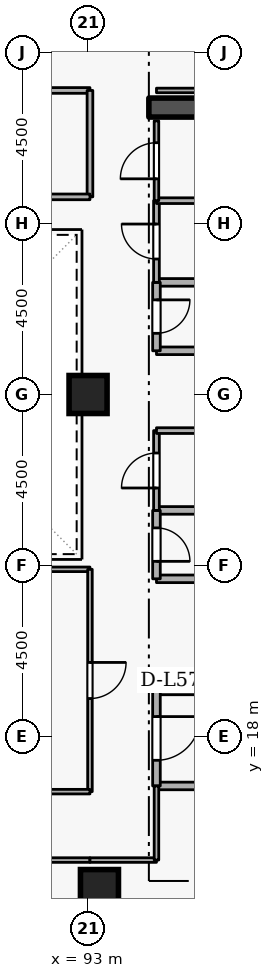
"""IFC4 building model, lengths in metres.
Left out: names, types, materials, properties, quantities, classifications, styles, units other than length and angle.
Written with IfcOpenShell. Run it as: python <this file> out.ifc"""

import sys

from ifc_helpers import new_model, si_unit, direction, frame, frame_2d, origin, origin_2d, place, context, subcontext, project, spatial, rectangle, extrude, element, fill, save


model = new_model("IFC4")
c1 = context("Model", 3, precision=1e-05, world=origin(), true_north=direction((0.0, 1.0)))
c2 = subcontext(c1, "Body", "Model", "MODEL_VIEW")
j1 = project(units=[si_unit("LENGTHUNIT", "METRE"), si_unit("PLANEANGLEUNIT", "RADIAN")], contexts=[c1])
p1 = place(None, origin())
s1 = spatial("IfcSite", under=j1, at=p1, CompositionType="ELEMENT")
p2 = place(p1, origin())
s2 = spatial("IfcBuilding", under=s1, at=p2, CompositionType="ELEMENT")
p3 = place(p2, frame((0.0, 0.0, 214.5)))
s3 = spatial("IfcBuildingStorey", under=s2, at=p3, CompositionType="ELEMENT", Elevation=214.5)
p4 = place(p3, frame((94.6, 34.55, 0.0), z_axis=(0.0, 0.0, 1.0), x_axis=(1.0, 0.0, 0.0)))
e1 = element("IfcWall", 1, at=p4, inside=s3, PredefinedType="SHEAR", context=c2, shape_type="SweptSolid", body=[
    extrude(rectangle(XDim=5.8, YDim=0.5, at=frame_2d((2.9, 0.0))), origin(), (0.0, 0.0, 1.0), 3.6),
])
for number, where, z_axis, x_axis in (
    (2, (93.3, 14.0, 0.0), (0.0, 0.0, 1.0), (1.0, 0.0, 0.0)),
    (3, (93.0, 27.0, 0.0), (0.0, 0.0, 1.0), (1.0, 0.0, 0.0)),
):
    element("IfcColumn", number, at=place(p3, frame(where, z_axis=z_axis, x_axis=x_axis)), inside=s3, PredefinedType="COLUMN", context=c2, shape_type="SweptSolid", body=[
        extrude(rectangle(XDim=1.0, YDim=1.0, at=origin_2d()), origin(), (0.0, 0.0, 1.0), 3.6),
    ])
p5 = place(p3, frame((94.8, 16.7, 0.0), z_axis=(0.0, 0.0, 1.0), x_axis=(1.0, 0.0, 0.0)))
e4 = element("IfcWall", 4, at=p5, inside=s3, PredefinedType="STANDARD", context=c2, shape_type="SweptSolid", body=[
    extrude(rectangle(XDim=5.7, YDim=0.2, at=frame_2d((2.85, 0.0))), origin(), (0.0, 0.0, 1.0), 3.34),
])
p6 = place(p3, frame((97.1, 19.2, 0.0), z_axis=(0.0, 0.0, 1.0), x_axis=(-1.0, 0.0, 0.0)))
e5 = element("IfcWall", 5, at=p6, inside=s3, PredefinedType="STANDARD", context=c2, shape_type="SweptSolid", body=[
    extrude(rectangle(XDim=2.3, YDim=0.2, at=frame_2d((1.15, 0.0))), origin(), (0.0, 0.0, 1.0), 2.545),
])
p7 = place(p3, frame((94.8, 19.2, 0.0), z_axis=(0.0, 0.0, 1.0), x_axis=(0.0, -1.0, 0.0)))
e6 = element("IfcWall", 6, at=p7, inside=s3, PredefinedType="STANDARD", context=c2, shape_type="SweptSolid", body=[
    extrude(rectangle(XDim=2.5, YDim=0.2, at=frame_2d((1.25, 0.0))), origin(), (0.0, 0.0, 1.0), 3.34),
])
p8 = place(p7, frame((0.675, 0.0, 0.0)))
e7 = element("IfcOpeningElement", 7, at=p8, cuts=e6, PredefinedType="OPENING", context=c2, shape_type="SweptSolid", body=[
    extrude(rectangle(XDim=1.15, YDim=2.1, at=frame_2d((0.575, 1.05))), frame((0.0, 0.11, 0.0), z_axis=(0.0, -1.0, 0.0), x_axis=(1.0, 0.0, 0.0)), (0.0, 0.0, 1.0), 0.22),
])
for number, where, z_axis, x_axis in (
    (8, (94.8, 28.15, 0.0), (0.0, 0.0, 1.0), (1.0, 0.0, 0.0)),
    (9, (96.85, 29.95, 0.0), (0.0, 0.0, 1.0), (-1.0, 0.0, 0.0)),
):
    element("IfcWall", number, at=place(p3, frame(where, z_axis=z_axis, x_axis=x_axis)), inside=s3, PredefinedType="STANDARD", context=c2, shape_type="SweptSolid", body=[
        extrude(rectangle(XDim=2.05, YDim=0.2, at=frame_2d((1.025, 0.0))), origin(), (0.0, 0.0, 1.0), 3.34),
    ])
p9 = place(p3, frame((94.8, 29.95, 0.0), z_axis=(0.0, 0.0, 1.0), x_axis=(0.0, -1.0, 0.0)))
e10 = element("IfcWall", 10, at=p9, inside=s3, PredefinedType="STANDARD", context=c2, shape_type="SweptSolid", body=[
    extrude(rectangle(XDim=1.8, YDim=0.2, at=frame_2d((0.9, 0.0))), origin(), (0.0, 0.0, 1.0), 3.34),
])
p10 = place(p9, frame((0.46, 0.0, 0.0)))
e11 = element("IfcOpeningElement", 11, at=p10, cuts=e10, PredefinedType="OPENING", context=c2, shape_type="SweptSolid", body=[
    extrude(rectangle(XDim=0.88, YDim=2.04, at=frame_2d((0.44, 1.02))), frame((0.0, 0.11, 0.0), z_axis=(0.0, -1.0, 0.0), x_axis=(1.0, 0.0, 0.0)), (0.0, 0.0, 1.0), 0.22),
])
for number, where, z_axis, x_axis in (
    (12, (94.8, 22.15, 0.0), (0.0, 0.0, 1.0), (1.0, 0.0, 0.0)),
    (13, (96.85, 23.95, 0.0), (0.0, 0.0, 1.0), (-1.0, 0.0, 0.0)),
):
    element("IfcWall", number, at=place(p3, frame(where, z_axis=z_axis, x_axis=x_axis)), inside=s3, PredefinedType="STANDARD", context=c2, shape_type="SweptSolid", body=[
        extrude(rectangle(XDim=2.05, YDim=0.2, at=frame_2d((1.025, 0.0))), origin(), (0.0, 0.0, 1.0), 3.34),
    ])
p11 = place(p3, frame((94.8, 23.95, 0.0), z_axis=(0.0, 0.0, 1.0), x_axis=(0.0, -1.0, 0.0)))
e14 = element("IfcWall", 14, at=p11, inside=s3, PredefinedType="STANDARD", context=c2, shape_type="SweptSolid", body=[
    extrude(rectangle(XDim=1.8, YDim=0.2, at=frame_2d((0.9, 0.0))), origin(), (0.0, 0.0, 1.0), 3.34),
])
p12 = place(p11, frame((0.46, 0.0, 0.0)))
e15 = element("IfcOpeningElement", 15, at=p12, cuts=e14, PredefinedType="OPENING", context=c2, shape_type="SweptSolid", body=[
    extrude(rectangle(XDim=0.88, YDim=2.04, at=frame_2d((0.44, 1.02))), frame((0.0, 0.11, 0.0), z_axis=(0.0, -1.0, 0.0), x_axis=(1.0, 0.0, 0.0)), (0.0, 0.0, 1.0), 0.22),
])
p13 = place(p3, frame((94.8, 23.95, 0.0), z_axis=(0.0, 0.0, 1.0), x_axis=(0.0, 1.0, 0.0)))
e16 = element("IfcWall", 16, at=p13, inside=s3, PredefinedType="PARTITIONING", context=c2, shape_type="SweptSolid", body=[
    extrude(rectangle(XDim=2.1, YDim=0.15, at=frame_2d((1.05, 0.0))), origin(), (0.0, 0.0, 1.0), 3.34),
])
p14 = place(p13, frame((0.59, 0.0, 0.0)))
e17 = element("IfcOpeningElement", 17, at=p14, cuts=e16, PredefinedType="OPENING", context=c2, shape_type="SweptSolid", body=[
    extrude(rectangle(XDim=0.92, YDim=2.08, at=frame_2d((0.46, 1.04))), frame((0.0, 0.085, 0.0), z_axis=(0.0, -1.0, 0.0), x_axis=(1.0, 0.0, 0.0)), (0.0, 0.0, 1.0), 0.17),
])
p15 = place(p3, frame((94.8, 26.05, 0.0), z_axis=(0.0, 0.0, 1.0), x_axis=(1.0, 0.0, 0.0)))
e18 = element("IfcWall", 18, at=p15, inside=s3, PredefinedType="PARTITIONING", context=c2, shape_type="SweptSolid", body=[
    extrude(rectangle(XDim=2.05, YDim=0.15, at=frame_2d((1.025, 0.0))), origin(), (0.0, 0.0, 1.0), 3.34),
])
p16 = place(p3, frame((94.8, 29.95, 0.0), z_axis=(0.0, 0.0, 1.0), x_axis=(0.0, 1.0, 0.0)))
e19 = element("IfcWall", 19, at=p16, inside=s3, PredefinedType="PARTITIONING", context=c2, shape_type="SweptSolid", body=[
    extrude(rectangle(XDim=2.15, YDim=0.15, at=frame_2d((1.075, 0.0))), origin(), (0.0, 0.0, 1.0), 3.34),
])
p17 = place(p16, frame((0.615, 0.0, 0.0)))
e20 = element("IfcOpeningElement", 20, at=p17, cuts=e19, PredefinedType="OPENING", context=c2, shape_type="SweptSolid", body=[
    extrude(rectangle(XDim=0.92, YDim=2.08, at=frame_2d((0.46, 1.04))), frame((0.0, 0.085, 0.0), z_axis=(0.0, -1.0, 0.0), x_axis=(1.0, 0.0, 0.0)), (0.0, 0.0, 1.0), 0.17),
])
p18 = place(p3, frame((94.8, 32.1, 0.0), z_axis=(0.0, 0.0, 1.0), x_axis=(1.0, 0.0, 0.0)))
e21 = element("IfcWall", 21, at=p18, inside=s3, PredefinedType="PARTITIONING", context=c2, shape_type="SweptSolid", body=[
    extrude(rectangle(XDim=2.05, YDim=0.15, at=frame_2d((1.025, 0.0))), origin(), (0.0, 0.0, 1.0), 3.34),
])
p19 = place(p3, frame((94.8, 32.1, 0.0), z_axis=(0.0, 0.0, 1.0), x_axis=(0.0, 1.0, 0.0)))
e22 = element("IfcWall", 22, at=p19, inside=s3, PredefinedType="PARTITIONING", context=c2, shape_type="SweptSolid", body=[
    extrude(rectangle(XDim=2.1, YDim=0.12, at=frame_2d((1.05, 0.0))), origin(), (0.0, 0.0, 1.0), 3.34),
])
p20 = place(p19, frame((0.575, 0.0, 0.0)))
e23 = element("IfcOpeningElement", 23, at=p20, cuts=e22, PredefinedType="OPENING", context=c2, shape_type="SweptSolid", body=[
    extrude(rectangle(XDim=0.95, YDim=2.1, at=frame_2d((0.475, 1.05))), frame((0.0, 0.07, 0.0), z_axis=(0.0, -1.0, 0.0), x_axis=(1.0, 0.0, 0.0)), (0.0, 0.0, 1.0), 0.14),
])
p21 = place(p3, frame((94.8, 35.0, 0.0), z_axis=(0.0, 0.0, 1.0), x_axis=(1.0, 0.0, 0.0)))
e24 = element("IfcWall", 24, at=p21, inside=s3, PredefinedType="PARTITIONING", context=c2, shape_type="SweptSolid", body=[
    extrude(rectangle(XDim=5.9, YDim=0.12, at=frame_2d((2.95, 0.0))), origin(), (0.0, 0.0, 1.0), 3.34),
])
p22 = place(p3, frame((87.3, 14.75, 0.0), z_axis=(0.0, 0.0, 1.0), x_axis=(1.0, 0.0, 0.0)))
e25 = element("IfcWall", 25, at=p22, inside=s3, PredefinedType="PARTITIONING", context=c2, shape_type="SweptSolid", body=[
    extrude(rectangle(XDim=5.75, YDim=0.12, at=frame_2d((2.875, 0.0))), origin(), (0.0, 0.0, 1.0), 3.34),
])
p23 = place(p22, frame((2.35, 0.0, 0.0)))
e26 = element("IfcOpeningElement", 26, at=p23, cuts=e25, PredefinedType="OPENING", context=c2, shape_type="SweptSolid", body=[
    extrude(rectangle(XDim=1.05, YDim=2.1, at=frame_2d((0.525, 1.05))), frame((0.0, 0.07, 0.0), z_axis=(0.0, -1.0, 0.0), x_axis=(1.0, 0.0, 0.0)), (0.0, 0.0, 1.0), 0.14),
])
p24 = place(p3, frame((93.05, 14.75, 0.0), z_axis=(0.0, 0.0, 1.0), x_axis=(1.0, 0.0, 0.0)))
e27 = element("IfcWall", 27, at=p24, inside=s3, PredefinedType="PARTITIONING", context=c2, shape_type="SweptSolid", body=[
    extrude(rectangle(XDim=1.75, YDim=0.12, at=frame_2d((0.875, 0.0))), origin(), (0.0, 0.0, 1.0), 3.34),
])
p25 = place(p3, frame((94.8, 14.75, 0.0), z_axis=(0.0, 0.0, 1.0), x_axis=(0.0, 1.0, 0.0)))
e28 = element("IfcWall", 28, at=p25, inside=s3, PredefinedType="PARTITIONING", context=c2, shape_type="SweptSolid", body=[
    extrude(rectangle(XDim=1.95, YDim=0.12, at=frame_2d((0.975, 0.0))), origin(), (0.0, 0.0, 1.0), 3.34),
])
p26 = place(p3, frame((87.3, 22.4, 0.0), z_axis=(0.0, 0.0, 1.0), x_axis=(1.0, 0.0, 0.0)))
e29 = element("IfcWall", 29, at=p26, inside=s3, PredefinedType="PARTITIONING", context=c2, shape_type="SweptSolid", body=[
    extrude(rectangle(XDim=5.75, YDim=0.12, at=frame_2d((2.875, 0.0))), origin(), (0.0, 0.0, 1.0), 3.34),
])
p27 = place(p3, frame((93.05, 22.4, 0.0), z_axis=(0.0, 0.0, 1.0), x_axis=(0.0, -1.0, 0.0)))
e30 = element("IfcWall", 30, at=p27, inside=s3, PredefinedType="PARTITIONING", context=c2, shape_type="SweptSolid", body=[
    extrude(rectangle(XDim=5.85, YDim=0.12, at=frame_2d((2.925, 0.0))), origin(), (0.0, 0.0, 1.0), 3.34),
])
p28 = place(p27, frame((2.45, 0.0, 0.0)))
e31 = element("IfcOpeningElement", 31, at=p28, cuts=e30, PredefinedType="OPENING", context=c2, shape_type="SweptSolid", body=[
    extrude(rectangle(XDim=0.95, YDim=2.1, at=frame_2d((0.475, 1.05))), frame((0.0, 0.07, 0.0), z_axis=(0.0, -1.0, 0.0), x_axis=(1.0, 0.0, 0.0)), (0.0, 0.0, 1.0), 0.14),
])
p29 = place(p3, frame((93.05, 16.55, 0.0), z_axis=(0.0, 0.0, 1.0), x_axis=(-1.0, 0.0, 0.0)))
e32 = element("IfcWall", 32, at=p29, inside=s3, PredefinedType="PARTITIONING", context=c2, shape_type="SweptSolid", body=[
    extrude(rectangle(XDim=5.75, YDim=0.12, at=frame_2d((2.875, 0.0))), origin(), (0.0, 0.0, 1.0), 3.34),
])
p30 = place(p3, frame((88.5, 35.0, 0.0), z_axis=(0.0, 0.0, 1.0), x_axis=(1.0, 0.0, 0.0)))
e33 = element("IfcWall", 33, at=p30, inside=s3, PredefinedType="PARTITIONING", context=c2, shape_type="SweptSolid", body=[
    extrude(rectangle(XDim=4.55, YDim=0.15, at=frame_2d((2.275, 0.0))), origin(), (0.0, 0.0, 1.0), 3.34),
])
p31 = place(p30, frame((1.625, 0.0, 0.0)))
e34 = element("IfcOpeningElement", 34, at=p31, cuts=e33, PredefinedType="OPENING", context=c2, shape_type="SweptSolid", body=[
    extrude(rectangle(XDim=1.3, YDim=2.12, at=frame_2d((0.65, 1.06))), frame((0.0, 0.085, 0.0), z_axis=(0.0, -1.0, 0.0), x_axis=(1.0, 0.0, 0.0)), (0.0, 0.0, 1.0), 0.17),
])
p32 = place(p3, frame((93.05, 35.0, 0.0), z_axis=(0.0, 0.0, 1.0), x_axis=(0.0, -1.0, 0.0)))
e35 = element("IfcWall", 35, at=p32, inside=s3, PredefinedType="PARTITIONING", context=c2, shape_type="SweptSolid", body=[
    extrude(rectangle(XDim=2.8, YDim=0.15, at=frame_2d((1.4, 0.0))), origin(), (0.0, 0.0, 1.0), 3.34),
])
p33 = place(p3, frame((93.05, 32.2, 0.0), z_axis=(0.0, 0.0, 1.0), x_axis=(-1.0, 0.0, 0.0)))
e36 = element("IfcWall", 36, at=p33, inside=s3, PredefinedType="PARTITIONING", context=c2, shape_type="SweptSolid", body=[
    extrude(rectangle(XDim=4.55, YDim=0.15, at=frame_2d((2.275, 0.0))), origin(), (0.0, 0.0, 1.0), 3.34),
])
p34 = place(p8, origin())
e37 = element("IfcDoor", 37, at=p34, inside=s3, OperationType="SINGLE_SWING_LEFT", PredefinedType="DOOR", context=c2, shape_type="SweptSolid", body=[
    extrude(rectangle(XDim=1.15, YDim=2.1, at=frame_2d((0.575, 1.05))), frame((0.0, 0.025, 0.0), z_axis=(0.0, -1.0, 0.0), x_axis=(1.0, 0.0, 0.0)), (0.0, 0.0, 1.0), 0.05),
])
fill(e7, e37)
p35 = place(p10, origin())
e38 = element("IfcDoor", 38, at=p35, inside=s3, OperationType="SINGLE_SWING_LEFT", PredefinedType="DOOR", context=c2, shape_type="SweptSolid", body=[
    extrude(rectangle(XDim=0.88, YDim=2.04, at=frame_2d((0.44, 1.02))), frame((0.0, 0.025, 0.0), z_axis=(0.0, -1.0, 0.0), x_axis=(1.0, 0.0, 0.0)), (0.0, 0.0, 1.0), 0.05),
])
fill(e11, e38)
p36 = place(p12, origin())
e39 = element("IfcDoor", 39, at=p36, inside=s3, OperationType="SINGLE_SWING_RIGHT", PredefinedType="DOOR", context=c2, shape_type="SweptSolid", body=[
    extrude(rectangle(XDim=0.88, YDim=2.04, at=frame_2d((0.44, 1.02))), frame((0.0, 0.025, 0.0), z_axis=(0.0, -1.0, 0.0), x_axis=(1.0, 0.0, 0.0)), (0.0, 0.0, 1.0), 0.05),
])
fill(e15, e39)
p37 = place(p14, origin())
e40 = element("IfcDoor", 40, at=p37, inside=s3, OperationType="SINGLE_SWING_LEFT", PredefinedType="DOOR", context=c2, shape_type="SweptSolid", body=[
    extrude(rectangle(XDim=0.92, YDim=2.08, at=frame_2d((0.46, 1.04))), frame((0.0, 0.025, 0.0), z_axis=(0.0, -1.0, 0.0), x_axis=(1.0, 0.0, 0.0)), (0.0, 0.0, 1.0), 0.05),
])
fill(e17, e40)
p38 = place(p17, origin())
e41 = element("IfcDoor", 41, at=p38, inside=s3, OperationType="SINGLE_SWING_RIGHT", PredefinedType="DOOR", context=c2, shape_type="SweptSolid", body=[
    extrude(rectangle(XDim=0.92, YDim=2.08, at=frame_2d((0.46, 1.04))), frame((0.0, 0.025, 0.0), z_axis=(0.0, -1.0, 0.0), x_axis=(1.0, 0.0, 0.0)), (0.0, 0.0, 1.0), 0.05),
])
fill(e20, e41)
p39 = place(p20, origin())
e42 = element("IfcDoor", 42, at=p39, inside=s3, OperationType="SINGLE_SWING_LEFT", PredefinedType="DOOR", context=c2, shape_type="SweptSolid", body=[
    extrude(rectangle(XDim=0.95, YDim=2.1, at=frame_2d((0.475, 1.05))), frame((0.0, 0.025, 0.0), z_axis=(0.0, -1.0, 0.0), x_axis=(1.0, 0.0, 0.0)), (0.0, 0.0, 1.0), 0.05),
])
fill(e23, e42)
p40 = place(p28, origin())
e43 = element("IfcDoor", 43, at=p40, inside=s3, OperationType="SINGLE_SWING_LEFT", PredefinedType="DOOR", context=c2, shape_type="SweptSolid", body=[
    extrude(rectangle(XDim=0.95, YDim=2.1, at=frame_2d((0.475, 1.05))), frame((0.0, 0.025, 0.0), z_axis=(0.0, -1.0, 0.0), x_axis=(1.0, 0.0, 0.0)), (0.0, 0.0, 1.0), 0.05),
])
fill(e31, e43)
save(model, sys.argv[1])
